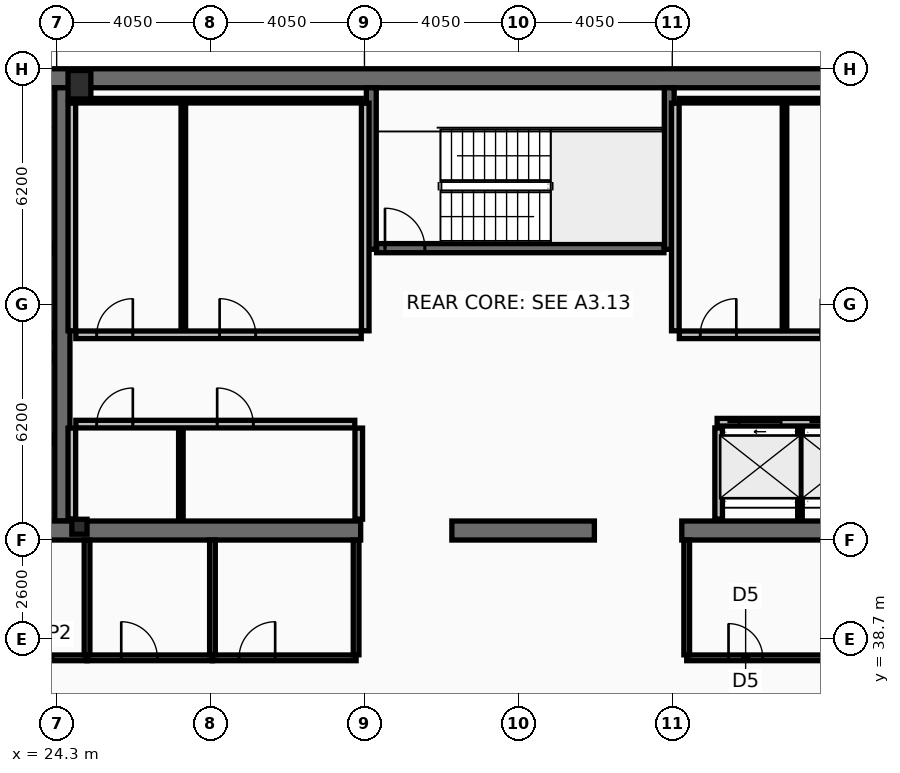
"""IFC4 building model, lengths in metres.
Left out: names, types, materials, properties, quantities, classifications, styles, units other than length and angle.
Written with IfcOpenShell. Run it as: python <this file> out.ifc"""

import sys

from ifc_helpers import new_model, si_unit, direction, frame, frame_2d, origin, origin_2d, place, context, subcontext, project, spatial, rectangle, hollow_rectangle, i_section, extrude, element, fill, save


model = new_model("IFC4")
c1 = context("Model", 3, precision=1e-05, world=origin(), true_north=direction((0.0, 1.0)))
c2 = subcontext(c1, "Body", "Model", "MODEL_VIEW")
j1 = project(units=[si_unit("LENGTHUNIT", "METRE"), si_unit("PLANEANGLEUNIT", "RADIAN")], contexts=[c1])
p1 = place(None, origin())
s1 = spatial("IfcSite", under=j1, at=p1, CompositionType="ELEMENT")
p2 = place(p1, origin())
s2 = spatial("IfcBuilding", under=s1, at=p2, CompositionType="ELEMENT")
p3 = place(p2, frame((0.0, 0.0, 273.4)))
s3 = spatial("IfcBuildingStorey", under=s2, at=p3, CompositionType="ELEMENT", Elevation=273.4)
p4 = place(p3, frame((16.2, 53.45, 0.0), z_axis=(0.0, 0.0, 1.0), x_axis=(1.0, 0.0, 0.0)))
e1 = element("IfcWall", 1, at=p4, inside=s3, PredefinedType="SHEAR", context=c2, shape_type="SweptSolid", body=[
    extrude(rectangle(XDim=40.5, YDim=0.5, at=frame_2d((20.25, 0.0))), origin(), (0.0, 0.0, 1.0), 3.44),
])
p5 = place(p3, frame((24.45, 41.8, 0.0), z_axis=(0.0, 0.0, 1.0), x_axis=(0.0, 1.0, 0.0)))
e2 = element("IfcWall", 2, at=p5, inside=s3, PredefinedType="SHEAR", context=c2, shape_type="SweptSolid", body=[
    extrude(rectangle(XDim=11.4, YDim=0.4, at=frame_2d((5.7, 0.0))), origin(), (0.0, 0.0, 1.0), 3.44),
])
p6 = place(p3, frame((32.3, 41.55, 0.0), z_axis=(0.0, 0.0, 1.0), x_axis=(-1.0, 0.0, 0.0)))
e3 = element("IfcWall", 3, at=p6, inside=s3, PredefinedType="SHEAR", context=c2, shape_type="SweptSolid", body=[
    extrude(rectangle(XDim=11.45, YDim=0.5, at=frame_2d((5.725, 0.0))), origin(), (0.0, 0.0, 1.0), 3.44),
])
p7 = place(p3, frame((38.45, 41.55, 0.0), z_axis=(0.0, 0.0, 1.0), x_axis=(-1.0, 0.0, 0.0)))
e4 = element("IfcWall", 4, at=p7, inside=s3, PredefinedType="SHEAR", context=c2, shape_type="SweptSolid", body=[
    extrude(rectangle(XDim=3.75, YDim=0.5, at=frame_2d((1.875, 0.0))), origin(), (0.0, 0.0, 1.0), 3.44),
])
p8 = place(p3, frame((52.05, 41.55, 0.0), z_axis=(0.0, 0.0, 1.0), x_axis=(-1.0, 0.0, 0.0)))
e5 = element("IfcWall", 5, at=p8, inside=s3, PredefinedType="SHEAR", context=c2, shape_type="SweptSolid", body=[
    extrude(rectangle(XDim=11.3, YDim=0.5, at=frame_2d((5.65, 0.0))), origin(), (0.0, 0.0, 1.0), 3.44),
])
for number, where, z_axis, x_axis in (
    (6, (32.58, 48.95, 0.0), (0.0, 0.0, 1.0), (0.0, 1.0, 0.0)),
    (7, (40.42, 48.95, 0.0), (0.0, 0.0, 1.0), (0.0, 1.0, 0.0)),
):
    element("IfcWall", number, at=place(p3, frame(where, z_axis=z_axis, x_axis=x_axis)), inside=s3, PredefinedType="SHEAR", context=c2, shape_type="SweptSolid", body=[
        extrude(rectangle(XDim=4.25, YDim=0.26, at=frame_2d((2.125, 0.0))), origin(), (0.0, 0.0, 1.0), 3.44),
    ])
p9 = place(p3, frame((16.7, 48.98, 0.0), z_axis=(0.0, 0.0, 1.0), x_axis=(1.0, 0.0, 0.0)))
e8 = element("IfcWall", 8, at=p9, inside=s3, PredefinedType="SHEAR", context=c2, shape_type="SweptSolid", body=[
    extrude(rectangle(XDim=7.52, YDim=0.24, at=frame_2d((3.76, 0.0))), origin(), (0.0, 0.0, 1.0), 3.44),
])
p10 = place(p9, frame((0.22, 0.0, 0.0)))
e9 = element("IfcOpeningElement", 9, at=p10, cuts=e8, PredefinedType="OPENING", context=c2, shape_type="SweptSolid", body=[
    extrude(rectangle(XDim=1.05, YDim=2.15, at=frame_2d((0.525, 1.075))), frame((0.0, 0.13, 0.0), z_axis=(0.0, -1.0, 0.0), x_axis=(1.0, 0.0, 0.0)), (0.0, 0.0, 1.0), 0.26),
])
p11 = place(p3, frame((32.72, 48.98, 0.0), z_axis=(0.0, 0.0, 1.0), x_axis=(1.0, 0.0, 0.0)))
e10 = element("IfcWall", 10, at=p11, inside=s3, PredefinedType="SHEAR", context=c2, shape_type="SweptSolid", body=[
    extrude(rectangle(XDim=7.56, YDim=0.24, at=frame_2d((3.78, 0.0))), origin(), (0.0, 0.0, 1.0), 3.44),
])
p12 = place(p11, frame((0.22, 0.0, 0.0)))
e11 = element("IfcOpeningElement", 11, at=p12, cuts=e10, PredefinedType="OPENING", context=c2, shape_type="SweptSolid", body=[
    extrude(rectangle(XDim=1.05, YDim=2.15, at=frame_2d((0.525, 1.075))), frame((0.0, 0.13, 0.0), z_axis=(0.0, -1.0, 0.0), x_axis=(1.0, 0.0, 0.0)), (0.0, 0.0, 1.0), 0.26),
])
p13 = place(p3, frame((24.9, 53.28, 0.0), z_axis=(0.0, 0.0, 1.0), x_axis=(1.0, 0.0, 0.0)))
e12 = element("IfcColumn", 12, at=p13, inside=s3, PredefinedType="COLUMN", context=c2, shape_type="SweptSolid", body=[
    extrude(hollow_rectangle(XDim=0.6, YDim=0.75, WallThickness=0.045, at=origin_2d()), origin(), (0.0, 0.0, 1.0), 3.6),
])
p14 = place(p3, frame((24.9, 41.65, 0.0), z_axis=(0.0, 0.0, 1.0), x_axis=(1.0, 0.0, 0.0)))
e13 = element("IfcColumn", 13, at=p14, inside=s3, PredefinedType="COLUMN", context=c2, shape_type="SweptSolid", body=[
    extrude(i_section(OverallWidth=0.399, OverallDepth=0.393, WebThickness=0.023, FlangeThickness=0.037, at=origin_2d()), origin(), (0.0, 0.0, 1.0), 3.6),
])
p15 = place(p3, frame((41.68, 44.4, 0.0), z_axis=(0.0, 0.0, 1.0), x_axis=(1.0, 0.0, 0.0)))
e14 = element("IfcWall", 14, at=p15, inside=s3, PredefinedType="PARTITIONING", context=c2, shape_type="SweptSolid", body=[
    extrude(rectangle(XDim=6.48, YDim=0.2, at=frame_2d((3.24, 0.0))), origin(), (0.0, 0.0, 1.0), 3.44),
])
p16 = place(p15, frame((0.58, 0.0, 0.0)))
e15 = element("IfcOpeningElement", 15, at=p16, cuts=e14, PredefinedType="OPENING", context=c2, shape_type="SweptSolid", body=[
    extrude(rectangle(XDim=1.1, YDim=2.18, at=frame_2d((0.55, 1.09))), frame((0.0, 0.11, 0.0), z_axis=(0.0, -1.0, 0.0), x_axis=(1.0, 0.0, 0.0)), (0.0, 0.0, 1.0), 0.22),
])
p17 = place(p15, frame((2.74, 0.0, 0.0)))
e16 = element("IfcOpeningElement", 16, at=p17, cuts=e14, PredefinedType="OPENING", context=c2, shape_type="SweptSolid", body=[
    extrude(rectangle(XDim=1.1, YDim=2.18, at=frame_2d((0.55, 1.09))), frame((0.0, 0.11, 0.0), z_axis=(0.0, -1.0, 0.0), x_axis=(1.0, 0.0, 0.0)), (0.0, 0.0, 1.0), 0.22),
])
p18 = place(p15, frame((4.9, 0.0, 0.0)))
e17 = element("IfcOpeningElement", 17, at=p18, cuts=e14, PredefinedType="OPENING", context=c2, shape_type="SweptSolid", body=[
    extrude(rectangle(XDim=1.1, YDim=2.18, at=frame_2d((0.55, 1.09))), frame((0.0, 0.11, 0.0), z_axis=(0.0, -1.0, 0.0), x_axis=(1.0, 0.0, 0.0)), (0.0, 0.0, 1.0), 0.22),
])
p19 = place(p3, frame((24.21, 43.95, 0.0), z_axis=(0.0, 0.0, 1.0), x_axis=(-1.0, 0.0, 0.0)))
e18 = element("IfcWall", 18, at=p19, inside=s3, PredefinedType="PARTITIONING", context=c2, shape_type="SweptSolid", body=[
    extrude(rectangle(XDim=2.97, YDim=0.2, at=frame_2d((1.485, 0.0))), origin(), (0.0, 0.0, 1.0), 3.44),
])
p20 = place(p19, frame((0.86, 0.0, 0.0)))
e19 = element("IfcOpeningElement", 19, at=p20, cuts=e18, PredefinedType="OPENING", context=c2, shape_type="SweptSolid", body=[
    extrude(rectangle(XDim=1.3, YDim=2.18, at=frame_2d((0.65, 1.09))), frame((0.0, 0.11, 0.0), z_axis=(0.0, -1.0, 0.0), x_axis=(1.0, 0.0, 0.0)), (0.0, 0.0, 1.0), 0.22),
])
p21 = place(p3, frame((24.21, 46.65, 0.0), z_axis=(0.0, 0.0, 1.0), x_axis=(-1.0, 0.0, 0.0)))
e20 = element("IfcWall", 20, at=p21, inside=s3, PredefinedType="PARTITIONING", context=c2, shape_type="SweptSolid", body=[
    extrude(rectangle(XDim=2.97, YDim=0.2, at=frame_2d((1.485, 0.0))), origin(), (0.0, 0.0, 1.0), 3.44),
])
p22 = place(p21, frame((0.91, 0.0, 0.0)))
e21 = element("IfcOpeningElement", 21, at=p22, cuts=e20, PredefinedType="OPENING", context=c2, shape_type="SweptSolid", body=[
    extrude(rectangle(XDim=1.2, YDim=2.18, at=frame_2d((0.6, 1.09))), frame((0.0, 0.11, 0.0), z_axis=(0.0, -1.0, 0.0), x_axis=(1.0, 0.0, 0.0)), (0.0, 0.0, 1.0), 0.22),
])
p23 = place(p3, frame((21.2, 46.12, 0.0), z_axis=(0.0, 0.0, 1.0), x_axis=(1.0, 0.0, 0.0)))
e22 = element("IfcWall", 22, at=p23, inside=s3, PredefinedType="PARTITIONING", context=c2, shape_type="SweptSolid", body=[
    extrude(rectangle(XDim=3.02, YDim=0.2, at=frame_2d((1.51, 0.0))), origin(), (0.0, 0.0, 1.0), 3.44),
])
for number, where, z_axis, x_axis in (
    (23, (24.7, 46.805, 0.0), (0.0, 0.0, 1.0), (0.0, 1.0, 0.0)),
    (24, (32.42, 46.805, 0.0), (0.0, 0.0, 1.0), (0.0, 1.0, 0.0)),
):
    element("IfcWall", number, at=place(p3, frame(where, z_axis=z_axis, x_axis=x_axis)), inside=s3, PredefinedType="PARTITIONING", context=c2, shape_type="SweptSolid", body=[
        extrude(rectangle(XDim=5.99, YDim=0.2, at=frame_2d((2.995, 0.0))), origin(), (0.0, 0.0, 1.0), 3.44),
    ])
p24 = place(p3, frame((24.805, 52.86, 0.0), z_axis=(0.0, 0.0, 1.0), x_axis=(1.0, 0.0, 0.0)))
e25 = element("IfcWall", 25, at=p24, inside=s3, PredefinedType="PARTITIONING", context=c2, shape_type="SweptSolid", body=[
    extrude(rectangle(XDim=7.51, YDim=0.12, at=frame_2d((3.755, 0.0))), origin(), (0.0, 0.0, 1.0), 3.44),
])
p25 = place(p3, frame((27.634, 46.805, 0.0), z_axis=(0.0, 0.0, 1.0), x_axis=(0.0, 1.0, 0.0)))
e26 = element("IfcWall", 26, at=p25, inside=s3, PredefinedType="PARTITIONING", context=c2, shape_type="SweptSolid", body=[
    extrude(rectangle(XDim=5.99, YDim=0.12, at=frame_2d((2.995, 0.0))), origin(), (0.0, 0.0, 1.0), 3.44),
])
p26 = place(p3, frame((24.805, 46.7, 0.0), z_axis=(0.0, 0.0, 1.0), x_axis=(1.0, 0.0, 0.0)))
e27 = element("IfcWall", 27, at=p26, inside=s3, PredefinedType="PARTITIONING", context=c2, shape_type="SweptSolid", body=[
    extrude(rectangle(XDim=7.51, YDim=0.2, at=frame_2d((3.755, 0.0))), origin(), (0.0, 0.0, 1.0), 3.44),
])
p27 = place(p26, frame((0.55, 0.0, 0.0)))
e28 = element("IfcOpeningElement", 28, at=p27, cuts=e27, PredefinedType="OPENING", context=c2, shape_type="SweptSolid", body=[
    extrude(rectangle(XDim=0.95, YDim=2.1, at=frame_2d((0.475, 1.05))), frame((0.0, 0.11, 0.0), z_axis=(0.0, -1.0, 0.0), x_axis=(1.0, 0.0, 0.0)), (0.0, 0.0, 1.0), 0.22),
])
p28 = place(p26, frame((3.784, 0.0, 0.0)))
e29 = element("IfcOpeningElement", 29, at=p28, cuts=e27, PredefinedType="OPENING", context=c2, shape_type="SweptSolid", body=[
    extrude(rectangle(XDim=0.95, YDim=2.1, at=frame_2d((0.475, 1.05))), frame((0.0, 0.11, 0.0), z_axis=(0.0, -1.0, 0.0), x_axis=(1.0, 0.0, 0.0)), (0.0, 0.0, 1.0), 0.22),
])
for number, where, z_axis, x_axis in (
    (30, (24.7, 41.85, 0.0), (0.0, 0.0, 1.0), (0.0, 1.0, 0.0)),
    (31, (32.25, 41.85, 0.0), (0.0, 0.0, 1.0), (0.0, 1.0, 0.0)),
):
    element("IfcWall", number, at=place(p3, frame(where, z_axis=z_axis, x_axis=x_axis)), inside=s3, PredefinedType="PARTITIONING", context=c2, shape_type="SweptSolid", body=[
        extrude(rectangle(XDim=2.395, YDim=0.2, at=frame_2d((1.198, 0.0))), origin(), (0.0, 0.0, 1.0), 3.44),
    ])
p29 = place(p3, frame((27.569, 41.85, 0.0), z_axis=(0.0, 0.0, 1.0), x_axis=(0.0, 1.0, 0.0)))
e32 = element("IfcWall", 32, at=p29, inside=s3, PredefinedType="PARTITIONING", context=c2, shape_type="SweptSolid", body=[
    extrude(rectangle(XDim=2.395, YDim=0.12, at=frame_2d((1.198, 0.0))), origin(), (0.0, 0.0, 1.0), 3.44),
])
p30 = place(p3, frame((24.805, 44.35, 0.0), z_axis=(0.0, 0.0, 1.0), x_axis=(1.0, 0.0, 0.0)))
e33 = element("IfcWall", 33, at=p30, inside=s3, PredefinedType="PARTITIONING", context=c2, shape_type="SweptSolid", body=[
    extrude(rectangle(XDim=7.34, YDim=0.2, at=frame_2d((3.67, 0.0))), origin(), (0.0, 0.0, 1.0), 3.44),
])
p31 = place(p30, frame((0.55, 0.0, 0.0)))
e34 = element("IfcOpeningElement", 34, at=p31, cuts=e33, PredefinedType="OPENING", context=c2, shape_type="SweptSolid", body=[
    extrude(rectangle(XDim=0.95, YDim=2.1, at=frame_2d((0.475, 1.05))), frame((0.0, 0.11, 0.0), z_axis=(0.0, -1.0, 0.0), x_axis=(1.0, 0.0, 0.0)), (0.0, 0.0, 1.0), 0.22),
])
p32 = place(p30, frame((3.719, 0.0, 0.0)))
e35 = element("IfcOpeningElement", 35, at=p32, cuts=e33, PredefinedType="OPENING", context=c2, shape_type="SweptSolid", body=[
    extrude(rectangle(XDim=0.95, YDim=2.1, at=frame_2d((0.475, 1.05))), frame((0.0, 0.11, 0.0), z_axis=(0.0, -1.0, 0.0), x_axis=(1.0, 0.0, 0.0)), (0.0, 0.0, 1.0), 0.22),
])
p33 = place(p3, frame((40.58, 46.805, 0.0), z_axis=(0.0, 0.0, 1.0), x_axis=(0.0, 1.0, 0.0)))
e36 = element("IfcWall", 36, at=p33, inside=s3, PredefinedType="PARTITIONING", context=c2, shape_type="SweptSolid", body=[
    extrude(rectangle(XDim=5.99, YDim=0.2, at=frame_2d((2.995, 0.0))), origin(), (0.0, 0.0, 1.0), 3.44),
])
p34 = place(p3, frame((40.685, 52.86, 0.0), z_axis=(0.0, 0.0, 1.0), x_axis=(1.0, 0.0, 0.0)))
e37 = element("IfcWall", 37, at=p34, inside=s3, PredefinedType="PARTITIONING", context=c2, shape_type="SweptSolid", body=[
    extrude(rectangle(XDim=7.35, YDim=0.12, at=frame_2d((3.675, 0.0))), origin(), (0.0, 0.0, 1.0), 3.44),
])
p35 = place(p3, frame((43.453, 46.805, 0.0), z_axis=(0.0, 0.0, 1.0), x_axis=(0.0, 1.0, 0.0)))
e38 = element("IfcWall", 38, at=p35, inside=s3, PredefinedType="PARTITIONING", context=c2, shape_type="SweptSolid", body=[
    extrude(rectangle(XDim=5.99, YDim=0.12, at=frame_2d((2.995, 0.0))), origin(), (0.0, 0.0, 1.0), 3.44),
])
p36 = place(p3, frame((40.685, 46.7, 0.0), z_axis=(0.0, 0.0, 1.0), x_axis=(1.0, 0.0, 0.0)))
e39 = element("IfcWall", 39, at=p36, inside=s3, PredefinedType="PARTITIONING", context=c2, shape_type="SweptSolid", body=[
    extrude(rectangle(XDim=7.35, YDim=0.2, at=frame_2d((3.675, 0.0))), origin(), (0.0, 0.0, 1.0), 3.44),
])
p37 = place(p36, frame((0.55, 0.0, 0.0)))
e40 = element("IfcOpeningElement", 40, at=p37, cuts=e39, PredefinedType="OPENING", context=c2, shape_type="SweptSolid", body=[
    extrude(rectangle(XDim=0.95, YDim=2.1, at=frame_2d((0.475, 1.05))), frame((0.0, 0.11, 0.0), z_axis=(0.0, -1.0, 0.0), x_axis=(1.0, 0.0, 0.0)), (0.0, 0.0, 1.0), 0.22),
])
p38 = place(p36, frame((3.723, 0.0, 0.0)))
e41 = element("IfcOpeningElement", 41, at=p38, cuts=e39, PredefinedType="OPENING", context=c2, shape_type="SweptSolid", body=[
    extrude(rectangle(XDim=0.95, YDim=2.1, at=frame_2d((0.475, 1.05))), frame((0.0, 0.11, 0.0), z_axis=(0.0, -1.0, 0.0), x_axis=(1.0, 0.0, 0.0)), (0.0, 0.0, 1.0), 0.22),
])
p39 = place(p3, frame((41.72, 41.85, 0.0), z_axis=(0.0, 0.0, 1.0), x_axis=(0.0, 1.0, 0.0)))
e42 = element("IfcWall", 42, at=p39, inside=s3, PredefinedType="PARTITIONING", context=c2, shape_type="SweptSolid", body=[
    extrude(rectangle(XDim=2.4, YDim=0.2, at=frame_2d((1.2, 0.0))), origin(), (0.0, 0.0, 1.0), 3.44),
])
p40 = place(p3, frame((43.86, 41.85, 0.0), z_axis=(0.0, 0.0, 1.0), x_axis=(0.0, 1.0, 0.0)))
e43 = element("IfcWall", 43, at=p40, inside=s3, PredefinedType="PARTITIONING", context=c2, shape_type="SweptSolid", body=[
    extrude(rectangle(XDim=2.4, YDim=0.12, at=frame_2d((1.2, 0.0))), origin(), (0.0, 0.0, 1.0), 3.44),
])
p41 = place(p3, frame((20.95, 38.2, 0.0), z_axis=(0.0, 0.0, 1.0), x_axis=(1.0, 0.0, 0.0)))
e44 = element("IfcWall", 44, at=p41, inside=s3, PredefinedType="PARTITIONING", context=c2, shape_type="SweptSolid", body=[
    extrude(rectangle(XDim=4.15, YDim=0.15, at=frame_2d((2.075, 0.0))), origin(), (0.0, 0.0, 1.0), 2.78),
])
p42 = place(p41, frame((0.9, 0.0, 0.0)))
e45 = element("IfcOpeningElement", 45, at=p42, cuts=e44, PredefinedType="OPENING", context=c2, shape_type="SweptSolid", body=[
    extrude(rectangle(XDim=0.95, YDim=2.05, at=frame_2d((0.475, 1.025))), frame((0.0, 0.085, 0.0), z_axis=(0.0, -1.0, 0.0), x_axis=(1.0, 0.0, 0.0)), (0.0, 0.0, 1.0), 0.17),
])
p43 = place(p3, frame((25.1, 38.2, 0.0), z_axis=(0.0, 0.0, 1.0), x_axis=(1.0, 0.0, 0.0)))
e46 = element("IfcWall", 46, at=p43, inside=s3, PredefinedType="PARTITIONING", context=c2, shape_type="SweptSolid", body=[
    extrude(rectangle(XDim=3.3, YDim=0.15, at=frame_2d((1.65, 0.0))), origin(), (0.0, 0.0, 1.0), 2.78),
])
p44 = place(p43, frame((0.9, 0.0, 0.0)))
e47 = element("IfcOpeningElement", 47, at=p44, cuts=e46, PredefinedType="OPENING", context=c2, shape_type="SweptSolid", body=[
    extrude(rectangle(XDim=0.95, YDim=2.05, at=frame_2d((0.475, 1.025))), frame((0.0, 0.085, 0.0), z_axis=(0.0, -1.0, 0.0), x_axis=(1.0, 0.0, 0.0)), (0.0, 0.0, 1.0), 0.17),
])
p45 = place(p3, frame((28.4, 38.2, 0.0), z_axis=(0.0, 0.0, 1.0), x_axis=(1.0, 0.0, 0.0)))
e48 = element("IfcWall", 48, at=p45, inside=s3, PredefinedType="PARTITIONING", context=c2, shape_type="SweptSolid", body=[
    extrude(rectangle(XDim=3.78, YDim=0.15, at=frame_2d((1.89, 0.0))), origin(), (0.0, 0.0, 1.0), 2.78),
])
p46 = place(p45, frame((0.7, 0.0, 0.0)))
e49 = element("IfcOpeningElement", 49, at=p46, cuts=e48, PredefinedType="OPENING", context=c2, shape_type="SweptSolid", body=[
    extrude(rectangle(XDim=0.95, YDim=2.05, at=frame_2d((0.475, 1.025))), frame((0.0, 0.085, 0.0), z_axis=(0.0, -1.0, 0.0), x_axis=(1.0, 0.0, 0.0)), (0.0, 0.0, 1.0), 0.17),
])
p47 = place(p3, frame((25.1, 38.28, 0.0), z_axis=(0.0, 0.0, 1.0), x_axis=(0.0, 1.0, 0.0)))
e50 = element("IfcWall", 50, at=p47, inside=s3, PredefinedType="PARTITIONING", context=c2, shape_type="SweptSolid", body=[
    extrude(rectangle(XDim=3.02, YDim=0.15, at=frame_2d((1.51, 0.0))), origin(), (0.0, 0.0, 1.0), 2.78),
])
for number, where, z_axis, x_axis in (
    (51, (28.4, 38.28, 0.0), (0.0, 0.0, 1.0), (0.0, 1.0, 0.0)),
    (52, (32.18, 38.28, 0.0), (0.0, 0.0, 1.0), (0.0, 1.0, 0.0)),
):
    element("IfcWall", number, at=place(p3, frame(where, z_axis=z_axis, x_axis=x_axis)), inside=s3, PredefinedType="PARTITIONING", context=c2, shape_type="SweptSolid", body=[
        extrude(rectangle(XDim=3.02, YDim=0.15, at=frame_2d((1.51, 0.0))), origin(), (0.0, 0.0, 1.0), 3.44),
    ])
p48 = place(p3, frame((40.88, 38.2, 0.0), z_axis=(0.0, 0.0, 1.0), x_axis=(1.0, 0.0, 0.0)))
e53 = element("IfcWall", 53, at=p48, inside=s3, PredefinedType="PARTITIONING", context=c2, shape_type="SweptSolid", body=[
    extrude(rectangle(XDim=3.92, YDim=0.15, at=frame_2d((1.96, 0.0))), origin(), (0.0, 0.0, 1.0), 2.78),
])
p49 = place(p48, frame((1.1, 0.0, 0.0)))
e54 = element("IfcOpeningElement", 54, at=p49, cuts=e53, PredefinedType="OPENING", context=c2, shape_type="SweptSolid", body=[
    extrude(rectangle(XDim=0.9, YDim=2.05, at=frame_2d((0.45, 1.025))), frame((0.0, 0.085, 0.0), z_axis=(0.0, -1.0, 0.0), x_axis=(1.0, 0.0, 0.0)), (0.0, 0.0, 1.0), 0.17),
])
p50 = place(p3, frame((40.88, 38.28, 0.0), z_axis=(0.0, 0.0, 1.0), x_axis=(0.0, 1.0, 0.0)))
e55 = element("IfcWall", 55, at=p50, inside=s3, PredefinedType="PARTITIONING", context=c2, shape_type="SweptSolid", body=[
    extrude(rectangle(XDim=3.02, YDim=0.15, at=frame_2d((1.51, 0.0))), origin(), (0.0, 0.0, 1.0), 3.44),
])
p51 = place(p12, origin())
e56 = element("IfcDoor", 56, at=p51, inside=s3, OperationType="SINGLE_SWING_LEFT", PredefinedType="DOOR", context=c2, shape_type="SweptSolid", body=[
    extrude(rectangle(XDim=1.05, YDim=2.15, at=frame_2d((0.525, 1.075))), frame((0.0, 0.025, 0.0), z_axis=(0.0, -1.0, 0.0), x_axis=(1.0, 0.0, 0.0)), (0.0, 0.0, 1.0), 0.05),
])
fill(e11, e56)
p52 = place(p16, origin())
e57 = element("IfcDoor", 57, at=p52, inside=s3, OperationType="SLIDING_TO_LEFT", PredefinedType="DOOR", context=c2, shape_type="SweptSolid", body=[
    extrude(rectangle(XDim=1.1, YDim=2.18, at=frame_2d((0.55, 1.09))), frame((0.0, 0.025, 0.0), z_axis=(0.0, -1.0, 0.0), x_axis=(1.0, 0.0, 0.0)), (0.0, 0.0, 1.0), 0.05),
])
fill(e15, e57)
p53 = place(p27, origin())
e58 = element("IfcDoor", 58, at=p53, inside=s3, OperationType="SINGLE_SWING_RIGHT", PredefinedType="DOOR", context=c2, shape_type="SweptSolid", body=[
    extrude(rectangle(XDim=0.95, YDim=2.1, at=frame_2d((0.475, 1.05))), frame((0.0, 0.025, 0.0), z_axis=(0.0, -1.0, 0.0), x_axis=(1.0, 0.0, 0.0)), (0.0, 0.0, 1.0), 0.05),
])
fill(e28, e58)
p54 = place(p28, origin())
e59 = element("IfcDoor", 59, at=p54, inside=s3, OperationType="SINGLE_SWING_LEFT", PredefinedType="DOOR", context=c2, shape_type="SweptSolid", body=[
    extrude(rectangle(XDim=0.95, YDim=2.1, at=frame_2d((0.475, 1.05))), frame((0.0, 0.025, 0.0), z_axis=(0.0, -1.0, 0.0), x_axis=(1.0, 0.0, 0.0)), (0.0, 0.0, 1.0), 0.05),
])
fill(e29, e59)
p55 = place(p31, origin())
e60 = element("IfcDoor", 60, at=p55, inside=s3, OperationType="SINGLE_SWING_RIGHT", PredefinedType="DOOR", context=c2, shape_type="SweptSolid", body=[
    extrude(rectangle(XDim=0.95, YDim=2.1, at=frame_2d((0.475, 1.05))), frame((0.0, 0.025, 0.0), z_axis=(0.0, -1.0, 0.0), x_axis=(1.0, 0.0, 0.0)), (0.0, 0.0, 1.0), 0.05),
])
fill(e34, e60)
p56 = place(p32, origin())
e61 = element("IfcDoor", 61, at=p56, inside=s3, OperationType="SINGLE_SWING_LEFT", PredefinedType="DOOR", context=c2, shape_type="SweptSolid", body=[
    extrude(rectangle(XDim=0.95, YDim=2.1, at=frame_2d((0.475, 1.05))), frame((0.0, 0.025, 0.0), z_axis=(0.0, -1.0, 0.0), x_axis=(1.0, 0.0, 0.0)), (0.0, 0.0, 1.0), 0.05),
])
fill(e35, e61)
p57 = place(p37, origin())
e62 = element("IfcDoor", 62, at=p57, inside=s3, OperationType="SINGLE_SWING_RIGHT", PredefinedType="DOOR", context=c2, shape_type="SweptSolid", body=[
    extrude(rectangle(XDim=0.95, YDim=2.1, at=frame_2d((0.475, 1.05))), frame((0.0, 0.025, 0.0), z_axis=(0.0, -1.0, 0.0), x_axis=(1.0, 0.0, 0.0)), (0.0, 0.0, 1.0), 0.05),
])
fill(e40, e62)
p58 = place(p44, origin())
e63 = element("IfcDoor", 63, at=p58, inside=s3, OperationType="SINGLE_SWING_LEFT", PredefinedType="DOOR", context=c2, shape_type="SweptSolid", body=[
    extrude(rectangle(XDim=0.95, YDim=2.05, at=frame_2d((0.475, 1.025))), frame((0.0, 0.025, 0.0), z_axis=(0.0, -1.0, 0.0), x_axis=(1.0, 0.0, 0.0)), (0.0, 0.0, 1.0), 0.05),
])
fill(e47, e63)
p59 = place(p46, origin())
e64 = element("IfcDoor", 64, at=p59, inside=s3, OperationType="SINGLE_SWING_RIGHT", PredefinedType="DOOR", context=c2, shape_type="SweptSolid", body=[
    extrude(rectangle(XDim=0.95, YDim=2.05, at=frame_2d((0.475, 1.025))), frame((0.0, 0.025, 0.0), z_axis=(0.0, -1.0, 0.0), x_axis=(1.0, 0.0, 0.0)), (0.0, 0.0, 1.0), 0.05),
])
fill(e49, e64)
p60 = place(p49, origin())
e65 = element("IfcDoor", 65, at=p60, inside=s3, OperationType="SINGLE_SWING_LEFT", PredefinedType="DOOR", context=c2, shape_type="SweptSolid", body=[
    extrude(rectangle(XDim=0.9, YDim=2.05, at=frame_2d((0.45, 1.025))), frame((0.0, 0.025, 0.0), z_axis=(0.0, -1.0, 0.0), x_axis=(1.0, 0.0, 0.0)), (0.0, 0.0, 1.0), 0.05),
])
fill(e54, e65)
save(model, sys.argv[1])
